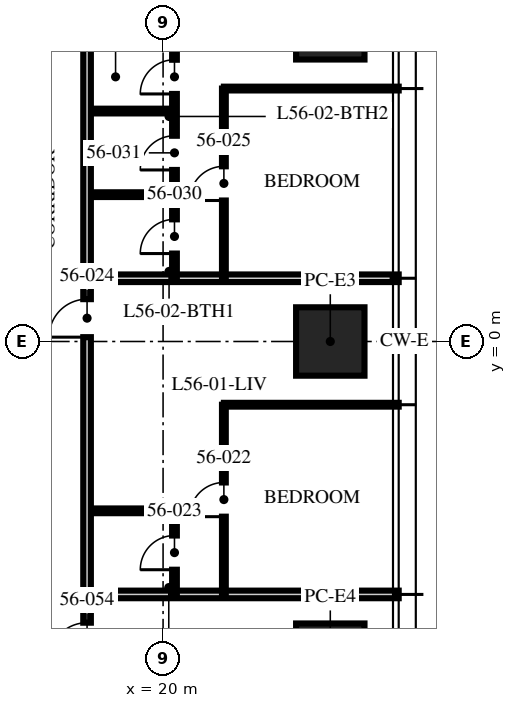
"""IFC4 building model, lengths in metres.
Left out: names, types, materials, properties, quantities, classifications, styles, units other than length and angle.
Written with IfcOpenShell. Run it as: python <this file> out.ifc"""

import sys

from ifc_helpers import new_model, si_unit, direction, frame, frame_2d, origin, origin_2d, place, context, subcontext, project, spatial, rectangle, extrude, element, fill, save


model = new_model("IFC4")
c1 = context("Model", 3, precision=1e-05, world=origin(), true_north=direction((0.0, 1.0)))
c2 = subcontext(c1, "Body", "Model", "MODEL_VIEW")
j1 = project(units=[si_unit("LENGTHUNIT", "METRE"), si_unit("PLANEANGLEUNIT", "RADIAN")], contexts=[c1])
p1 = place(None, origin())
s1 = spatial("IfcSite", under=j1, at=p1, CompositionType="ELEMENT")
p2 = place(p1, origin())
s2 = spatial("IfcBuilding", under=s1, at=p2, CompositionType="ELEMENT")
p3 = place(p2, frame((0.0, 0.0, 225.75)))
s3 = spatial("IfcBuildingStorey", under=s2, at=p3, CompositionType="ELEMENT", Elevation=225.75)
for number, where, z_axis, x_axis in (
    (1, (24.4, 8.32, 0.0), (0.0, 0.0, 1.0), (0.0, 1.0, 0.0)),
    (2, (24.4, 0.0, 0.0), (0.0, 0.0, 1.0), (0.0, 1.0, 0.0)),
    (3, (24.4, -8.32, 0.0), (0.0, 0.0, 1.0), (0.0, 1.0, 0.0)),
):
    element("IfcColumn", number, at=place(p3, frame(where, z_axis=z_axis, x_axis=x_axis)), inside=s3, PredefinedType="COLUMN", context=c2, shape_type="SweptSolid", body=[
        extrude(rectangle(XDim=1.8, YDim=1.8, at=origin_2d()), origin(), (0.0, 0.0, 1.0), 3.75),
    ])
p4 = place(p3, frame((18.1, -6.656, 0.0), z_axis=(0.0, 0.0, 1.0), x_axis=(1.0, 0.0, 0.0)))
e4 = element("IfcWall", 4, at=p4, inside=s3, PredefinedType="PARTITIONING", context=c2, shape_type="SweptSolid", body=[
    extrude(rectangle(XDim=8.1, YDim=0.2, at=frame_2d((4.05, 0.0))), origin(), (0.0, 0.0, 1.0), 2.91),
])
p5 = place(p3, frame((21.6, -1.664, 0.0), z_axis=(0.0, 0.0, 1.0), x_axis=(1.0, 0.0, 0.0)))
e5 = element("IfcWall", 5, at=p5, inside=s3, PredefinedType="PARTITIONING", context=c2, shape_type="SweptSolid", body=[
    extrude(rectangle(XDim=4.6, YDim=0.1, at=frame_2d((2.3, 0.0))), origin(), (0.0, 0.0, 1.0), 2.91),
])
p6 = place(p3, frame((18.1, 1.664, 0.0), z_axis=(0.0, 0.0, 1.0), x_axis=(1.0, 0.0, 0.0)))
e6 = element("IfcWall", 6, at=p6, inside=s3, PredefinedType="PARTITIONING", context=c2, shape_type="SweptSolid", body=[
    extrude(rectangle(XDim=8.1, YDim=0.2, at=frame_2d((4.05, 0.0))), origin(), (0.0, 0.0, 1.0), 2.91),
])
p7 = place(p3, frame((21.6, 6.656, 0.0), z_axis=(0.0, 0.0, 1.0), x_axis=(1.0, 0.0, 0.0)))
e7 = element("IfcWall", 7, at=p7, inside=s3, PredefinedType="PARTITIONING", context=c2, shape_type="SweptSolid", body=[
    extrude(rectangle(XDim=4.6, YDim=0.1, at=frame_2d((2.3, 0.0))), origin(), (0.0, 0.0, 1.0), 2.91),
])
p8 = place(p3, frame((21.6, -6.656, 0.0), z_axis=(0.0, 0.0, 1.0), x_axis=(0.0, 1.0, 0.0)))
e8 = element("IfcWall", 8, at=p8, inside=s3, PredefinedType="PARTITIONING", context=c2, shape_type="SweptSolid", body=[
    extrude(rectangle(XDim=4.992, YDim=0.1, at=frame_2d((2.496, 0.0))), origin(), (0.0, 0.0, 1.0), 2.81),
])
p9 = place(p8, frame((2.046, 0.0, 0.0)))
e9 = element("IfcOpeningElement", 9, at=p9, cuts=e8, PredefinedType="OPENING", context=c2, shape_type="SweptSolid", body=[
    extrude(rectangle(XDim=0.9, YDim=2.1, at=frame_2d((0.45, 1.05))), frame((0.0, 0.06, 0.0), z_axis=(0.0, -1.0, 0.0), x_axis=(1.0, 0.0, 0.0)), (0.0, 0.0, 1.0), 0.12),
])
p10 = place(p3, frame((20.3, -6.656, 0.0), z_axis=(0.0, 0.0, 1.0), x_axis=(0.0, 1.0, 0.0)))
e10 = element("IfcWall", 10, at=p10, inside=s3, PredefinedType="PARTITIONING", context=c2, shape_type="SweptSolid", body=[
    extrude(rectangle(XDim=2.2, YDim=0.125, at=frame_2d((1.1, 0.0))), origin(), (0.0, 0.0, 1.0), 3.5),
])
p11 = place(p10, frame((0.65, 0.0, 0.0)))
e11 = element("IfcOpeningElement", 11, at=p11, cuts=e10, PredefinedType="OPENING", context=c2, shape_type="SweptSolid", body=[
    extrude(rectangle(XDim=0.9, YDim=2.1, at=frame_2d((0.45, 1.05))), frame((0.0, 0.073, 0.0), z_axis=(0.0, -1.0, 0.0), x_axis=(1.0, 0.0, 0.0)), (0.0, 0.0, 1.0), 0.145),
])
p12 = place(p3, frame((18.1, -4.456, 0.0), z_axis=(0.0, 0.0, 1.0), x_axis=(1.0, 0.0, 0.0)))
e12 = element("IfcWall", 12, at=p12, inside=s3, PredefinedType="PARTITIONING", context=c2, shape_type="SweptSolid", body=[
    extrude(rectangle(XDim=2.2, YDim=0.125, at=frame_2d((1.1, 0.0))), origin(), (0.0, 0.0, 1.0), 3.5),
])
p13 = place(p3, frame((21.6, 1.664, 0.0), z_axis=(0.0, 0.0, 1.0), x_axis=(0.0, 1.0, 0.0)))
e13 = element("IfcWall", 13, at=p13, inside=s3, PredefinedType="PARTITIONING", context=c2, shape_type="SweptSolid", body=[
    extrude(rectangle(XDim=4.992, YDim=0.1, at=frame_2d((2.496, 0.0))), origin(), (0.0, 0.0, 1.0), 2.81),
])
p14 = place(p13, frame((2.046, 0.0, 0.0)))
e14 = element("IfcOpeningElement", 14, at=p14, cuts=e13, PredefinedType="OPENING", context=c2, shape_type="SweptSolid", body=[
    extrude(rectangle(XDim=0.9, YDim=2.1, at=frame_2d((0.45, 1.05))), frame((0.0, 0.06, 0.0), z_axis=(0.0, -1.0, 0.0), x_axis=(1.0, 0.0, 0.0)), (0.0, 0.0, 1.0), 0.12),
])
p15 = place(p3, frame((20.3, 1.664, 0.0), z_axis=(0.0, 0.0, 1.0), x_axis=(0.0, 1.0, 0.0)))
e15 = element("IfcWall", 15, at=p15, inside=s3, PredefinedType="PARTITIONING", context=c2, shape_type="SweptSolid", body=[
    extrude(rectangle(XDim=6.2, YDim=0.125, at=frame_2d((3.1, 0.0))), origin(), (0.0, 0.0, 1.0), 2.81),
])
p16 = place(p15, frame((0.65, 0.0, 0.0)))
e16 = element("IfcOpeningElement", 16, at=p16, cuts=e15, PredefinedType="OPENING", context=c2, shape_type="SweptSolid", body=[
    extrude(rectangle(XDim=0.9, YDim=2.1, at=frame_2d((0.45, 1.05))), frame((0.0, 0.073, 0.0), z_axis=(0.0, -1.0, 0.0), x_axis=(1.0, 0.0, 0.0)), (0.0, 0.0, 1.0), 0.145),
])
p17 = place(p15, frame((2.85, 0.0, 0.0)))
e17 = element("IfcOpeningElement", 17, at=p17, cuts=e15, PredefinedType="OPENING", context=c2, shape_type="SweptSolid", body=[
    extrude(rectangle(XDim=0.9, YDim=2.1, at=frame_2d((0.45, 1.05))), frame((0.0, 0.073, 0.0), z_axis=(0.0, -1.0, 0.0), x_axis=(1.0, 0.0, 0.0)), (0.0, 0.0, 1.0), 0.145),
])
p18 = place(p15, frame((4.85, 0.0, 0.0)))
e18 = element("IfcOpeningElement", 18, at=p18, cuts=e15, PredefinedType="OPENING", context=c2, shape_type="SweptSolid", body=[
    extrude(rectangle(XDim=0.9, YDim=2.1, at=frame_2d((0.45, 1.05))), frame((0.0, 0.073, 0.0), z_axis=(0.0, -1.0, 0.0), x_axis=(1.0, 0.0, 0.0)), (0.0, 0.0, 1.0), 0.145),
])
for number, where, z_axis, x_axis in (
    (19, (18.1, 3.864, 0.0), (0.0, 0.0, 1.0), (1.0, 0.0, 0.0)),
    (20, (18.1, 6.064, 0.0), (0.0, 0.0, 1.0), (1.0, 0.0, 0.0)),
):
    element("IfcWall", number, at=place(p3, frame(where, z_axis=z_axis, x_axis=x_axis)), inside=s3, PredefinedType="PARTITIONING", context=c2, shape_type="SweptSolid", body=[
        extrude(rectangle(XDim=2.2, YDim=0.125, at=frame_2d((1.1, 0.0))), origin(), (0.0, 0.0, 1.0), 3.5),
    ])
p19 = place(p3, frame((18.0, -13.0, 0.0), z_axis=(0.0, 0.0, 1.0), x_axis=(0.0, 1.0, 0.0)))
e21 = element("IfcWall", 21, at=p19, inside=s3, PredefinedType="PARTITIONING", context=c2, shape_type="SweptSolid", body=[
    extrude(rectangle(XDim=25.8, YDim=0.2, at=frame_2d((12.9, 0.0))), origin(), (0.0, 0.0, 1.0), 2.6),
])
p20 = place(p19, frame((13.114, 0.0, 0.0)))
e22 = element("IfcOpeningElement", 22, at=p20, cuts=e21, PredefinedType="OPENING", context=c2, shape_type="SweptSolid", body=[
    extrude(rectangle(XDim=1.0, YDim=2.2, at=frame_2d((0.5, 1.1))), frame((0.0, 0.11, 0.0), z_axis=(0.0, -1.0, 0.0), x_axis=(1.0, 0.0, 0.0)), (0.0, 0.0, 1.0), 0.22),
])
p21 = place(p19, frame((23.684, 0.0, 0.0)))
e23 = element("IfcOpeningElement", 23, at=p21, cuts=e21, PredefinedType="OPENING", context=c2, shape_type="SweptSolid", body=[
    extrude(rectangle(XDim=1.0, YDim=2.2, at=frame_2d((0.5, 1.1))), frame((0.0, 0.11, 0.0), z_axis=(0.0, -1.0, 0.0), x_axis=(1.0, 0.0, 0.0)), (0.0, 0.0, 1.0), 0.22),
])
p22 = place(p19, frame((4.6, 0.0, 0.0)))
e24 = element("IfcOpeningElement", 24, at=p22, cuts=e21, PredefinedType="OPENING", context=c2, shape_type="SweptSolid", body=[
    extrude(rectangle(XDim=1.0, YDim=2.2, at=frame_2d((0.5, 1.1))), frame((0.0, 0.11, 0.0), z_axis=(0.0, -1.0, 0.0), x_axis=(1.0, 0.0, 0.0)), (0.0, 0.0, 1.0), 0.22),
])
p23 = place(p9, origin())
e25 = element("IfcDoor", 25, at=p23, inside=s3, OperationType="SINGLE_SWING_LEFT", PredefinedType="DOOR", context=c2, shape_type="SweptSolid", body=[
    extrude(rectangle(XDim=0.9, YDim=2.1, at=frame_2d((0.45, 1.05))), frame((0.0, 0.025, 0.0), z_axis=(0.0, -1.0, 0.0), x_axis=(1.0, 0.0, 0.0)), (0.0, 0.0, 1.0), 0.05),
])
fill(e9, e25)
p24 = place(p11, origin())
e26 = element("IfcDoor", 26, at=p24, inside=s3, OperationType="SINGLE_SWING_LEFT", PredefinedType="DOOR", context=c2, shape_type="SweptSolid", body=[
    extrude(rectangle(XDim=0.9, YDim=2.1, at=frame_2d((0.45, 1.05))), frame((0.0, 0.025, 0.0), z_axis=(0.0, -1.0, 0.0), x_axis=(1.0, 0.0, 0.0)), (0.0, 0.0, 1.0), 0.05),
])
fill(e11, e26)
p25 = place(p20, origin())
e27 = element("IfcDoor", 27, at=p25, inside=s3, OperationType="SINGLE_SWING_LEFT", PredefinedType="DOOR", context=c2, shape_type="SweptSolid", body=[
    extrude(rectangle(XDim=1.0, YDim=2.2, at=frame_2d((0.5, 1.1))), frame((0.0, 0.025, 0.0), z_axis=(0.0, -1.0, 0.0), x_axis=(1.0, 0.0, 0.0)), (0.0, 0.0, 1.0), 0.05),
])
fill(e22, e27)
p26 = place(p14, origin())
e28 = element("IfcDoor", 28, at=p26, inside=s3, OperationType="SINGLE_SWING_LEFT", PredefinedType="DOOR", context=c2, shape_type="SweptSolid", body=[
    extrude(rectangle(XDim=0.9, YDim=2.1, at=frame_2d((0.45, 1.05))), frame((0.0, 0.025, 0.0), z_axis=(0.0, -1.0, 0.0), x_axis=(1.0, 0.0, 0.0)), (0.0, 0.0, 1.0), 0.05),
])
fill(e14, e28)
p27 = place(p16, origin())
e29 = element("IfcDoor", 29, at=p27, inside=s3, OperationType="SINGLE_SWING_LEFT", PredefinedType="DOOR", context=c2, shape_type="SweptSolid", body=[
    extrude(rectangle(XDim=0.9, YDim=2.1, at=frame_2d((0.45, 1.05))), frame((0.0, 0.025, 0.0), z_axis=(0.0, -1.0, 0.0), x_axis=(1.0, 0.0, 0.0)), (0.0, 0.0, 1.0), 0.05),
])
fill(e16, e29)
p28 = place(p17, origin())
e30 = element("IfcDoor", 30, at=p28, inside=s3, OperationType="SINGLE_SWING_LEFT", PredefinedType="DOOR", context=c2, shape_type="SweptSolid", body=[
    extrude(rectangle(XDim=0.9, YDim=2.1, at=frame_2d((0.45, 1.05))), frame((0.0, 0.025, 0.0), z_axis=(0.0, -1.0, 0.0), x_axis=(1.0, 0.0, 0.0)), (0.0, 0.0, 1.0), 0.05),
])
fill(e17, e30)
p29 = place(p18, origin())
e31 = element("IfcDoor", 31, at=p29, inside=s3, OperationType="SINGLE_SWING_LEFT", PredefinedType="DOOR", context=c2, shape_type="SweptSolid", body=[
    extrude(rectangle(XDim=0.9, YDim=2.1, at=frame_2d((0.45, 1.05))), frame((0.0, 0.025, 0.0), z_axis=(0.0, -1.0, 0.0), x_axis=(1.0, 0.0, 0.0)), (0.0, 0.0, 1.0), 0.05),
])
fill(e18, e31)
p30 = place(p22, origin())
e32 = element("IfcDoor", 32, at=p30, inside=s3, OperationType="SINGLE_SWING_LEFT", PredefinedType="DOOR", context=c2, shape_type="SweptSolid", body=[
    extrude(rectangle(XDim=1.0, YDim=2.2, at=frame_2d((0.5, 1.1))), frame((0.0, 0.025, 0.0), z_axis=(0.0, -1.0, 0.0), x_axis=(1.0, 0.0, 0.0)), (0.0, 0.0, 1.0), 0.05),
])
fill(e24, e32)
save(model, sys.argv[1])
